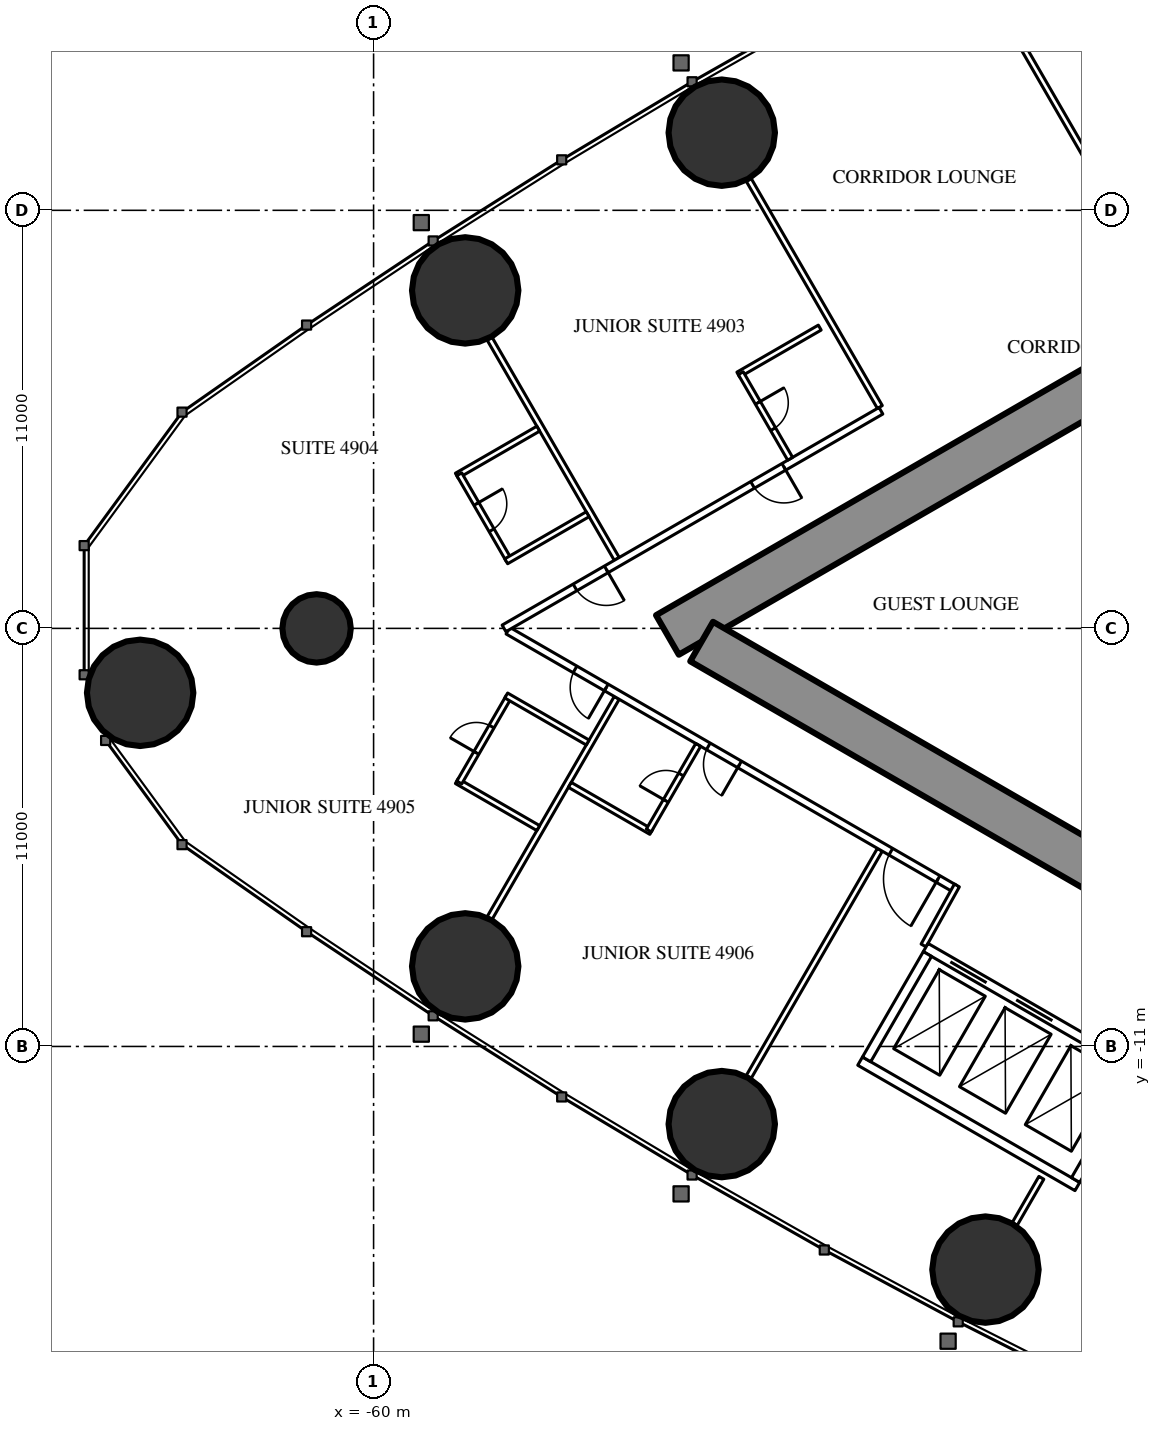
"""IFC4 building model, lengths in metres.
Left out: names, types, materials, properties, quantities, classifications, styles, units other than length and angle.
Written with IfcOpenShell. Run it as: python <this file> out.ifc"""

import sys

from ifc_helpers import new_model, si_unit, direction, frame, frame_2d, origin, origin_2d, place, context, subcontext, project, spatial, rectangle, circle, extrude, element, fill, save


model = new_model("IFC4")
c1 = context("Model", 3, precision=1e-05, world=origin(), true_north=direction((0.0, 1.0)))
c2 = subcontext(c1, "Body", "Model", "MODEL_VIEW")
j1 = project(units=[si_unit("LENGTHUNIT", "METRE"), si_unit("PLANEANGLEUNIT", "RADIAN")], contexts=[c1])
p1 = place(None, origin())
s1 = spatial("IfcSite", under=j1, at=p1, CompositionType="ELEMENT")
p2 = place(p1, origin())
s2 = spatial("IfcBuilding", under=s1, at=p2, CompositionType="ELEMENT")
p3 = place(p2, frame((0.0, 0.0, 184.3)))
s3 = spatial("IfcBuildingStorey", under=s2, at=p3, CompositionType="ELEMENT", Elevation=184.3)
for number, where, z_axis, x_axis in (
    (1, (-66.143, -1.695, 0.0), (0.0, 0.0, 1.0), (1.0, 0.0, 0.0)),
    (2, (-57.59, -8.893, 0.0), (0.0, 0.0, 1.0), (1.0, 0.0, 0.0)),
    (3, (-50.839, -13.043, 0.0), (0.0, 0.0, 1.0), (1.0, 0.0, 0.0)),
    (4, (-43.9, -16.871, 0.0), (0.0, 0.0, 1.0), (1.0, 0.0, 0.0)),
    (5, (-50.839, 13.043, 0.0), (0.0, 0.0, 1.0), (1.0, 0.0, 0.0)),
    (6, (-57.59, 8.893, 0.0), (0.0, 0.0, 1.0), (1.0, 0.0, 0.0)),
):
    element("IfcColumn", number, at=place(p3, frame(where, z_axis=z_axis, x_axis=x_axis)), inside=s3, PredefinedType="COLUMN", context=c2, shape_type="SweptSolid", body=[
        extrude(circle(Radius=1.4, at=origin_2d()), origin(), (0.0, 0.0, 1.0), 3.5),
    ])
p4 = place(p3, frame((-61.5, 0.0, 0.0), z_axis=(0.0, 0.0, 1.0), x_axis=(1.0, 0.0, 0.0)))
e7 = element("IfcColumn", 7, at=p4, inside=s3, PredefinedType="COLUMN", context=c2, shape_type="SweptSolid", body=[
    extrude(circle(Radius=0.9, at=origin_2d()), origin(), (0.0, 0.0, 1.0), 3.5),
])
p5 = place(p3, frame((-27.2, 14.3, 0.0), z_axis=(0.0, 0.0, 1.0), x_axis=(-0.866026593062, -0.499997940104, 0.0)))
e8 = element("IfcWall", 8, at=p5, inside=s3, PredefinedType="SHEAR", context=c2, shape_type="SweptSolid", body=[
    extrude(rectangle(XDim=28.946, YDim=1.2, at=frame_2d((14.473, 0.0))), origin(), (0.0, 0.0, 1.0), 3.5),
])
p6 = place(p5, frame((4.6, 0.0, 0.0)))
e9 = element("IfcOpeningElement", 9, at=p6, cuts=e8, PredefinedType="OPENING", context=c2, shape_type="SweptSolid", body=[
    extrude(rectangle(XDim=1.0, YDim=2.2, at=frame_2d((0.5, 1.1))), frame((0.0, 0.61, 0.0), z_axis=(0.0, -1.0, 0.0), x_axis=(1.0, 0.0, 0.0)), (0.0, 0.0, 1.0), 1.22),
])
p7 = place(p5, frame((13.395, 0.0, 0.0)))
e10 = element("IfcOpeningElement", 10, at=p7, cuts=e8, PredefinedType="OPENING", context=c2, shape_type="SweptSolid", body=[
    extrude(rectangle(XDim=1.8, YDim=2.2, at=frame_2d((0.9, 1.1))), frame((0.0, 0.61, 0.0), z_axis=(0.0, -1.0, 0.0), x_axis=(1.0, 0.0, 0.0)), (0.0, 0.0, 1.0), 1.22),
])
p8 = place(p3, frame((-27.2, -14.3, 0.0), z_axis=(0.0, 0.0, 1.0), x_axis=(-0.866024021859, 0.500002393557, 0.0)))
e11 = element("IfcWall", 11, at=p8, inside=s3, PredefinedType="SHEAR", context=c2, shape_type="SweptSolid", body=[
    extrude(rectangle(XDim=27.907, YDim=1.2, at=frame_2d((13.954, 0.0))), origin(), (0.0, 0.0, 1.0), 3.5),
])
p9 = place(p8, frame((4.6, 0.0, 0.0)))
e12 = element("IfcOpeningElement", 12, at=p9, cuts=e11, PredefinedType="OPENING", context=c2, shape_type="SweptSolid", body=[
    extrude(rectangle(XDim=1.0, YDim=2.2, at=frame_2d((0.5, 1.1))), frame((0.0, 0.61, 0.0), z_axis=(0.0, -1.0, 0.0), x_axis=(1.0, 0.0, 0.0)), (0.0, 0.0, 1.0), 1.22),
])
p10 = place(p8, frame((13.395, 0.0, 0.0)))
e13 = element("IfcOpeningElement", 13, at=p10, cuts=e11, PredefinedType="OPENING", context=c2, shape_type="SweptSolid", body=[
    extrude(rectangle(XDim=1.8, YDim=2.2, at=frame_2d((0.9, 1.1))), frame((0.0, 0.61, 0.0), z_axis=(0.0, -1.0, 0.0), x_axis=(1.0, 0.0, 0.0)), (0.0, 0.0, 1.0), 1.22),
])
p11 = place(p3, frame((-39.754, 9.823, 0.0), z_axis=(0.0, 0.0, 1.0), x_axis=(-0.499997670926, 0.866026748472, 0.0)))
e14 = element("IfcWall", 14, at=p11, inside=s3, PredefinedType="PARTITIONING", context=c2, shape_type="SweptSolid", body=[
    extrude(rectangle(XDim=6.757, YDim=0.15, at=frame_2d((3.379, 0.0))), origin(), (0.0, 0.0, 1.0), 2.3),
])
p12 = place(p3, frame((-46.679, 5.825, 0.0), z_axis=(0.0, 0.0, 1.0), x_axis=(-0.500006839597, 0.866021454905, 0.0)))
e15 = element("IfcWall", 15, at=p12, inside=s3, PredefinedType="PARTITIONING", context=c2, shape_type="SweptSolid", body=[
    extrude(rectangle(XDim=6.911, YDim=0.15, at=frame_2d((3.456, 0.0))), origin(), (0.0, 0.0, 1.0), 2.3),
])
p13 = place(p3, frame((-53.602, 1.828, 0.0), z_axis=(0.0, 0.0, 1.0), x_axis=(-0.49999191814, 0.866030069798, 0.0)))
e16 = element("IfcWall", 16, at=p13, inside=s3, PredefinedType="PARTITIONING", context=c2, shape_type="SweptSolid", body=[
    extrude(rectangle(XDim=6.692, YDim=0.15, at=frame_2d((3.346, 0.0))), origin(), (0.0, 0.0, 1.0), 2.3),
])
p14 = place(p3, frame((-46.679, -5.825, 0.0), z_axis=(0.0, 0.0, 1.0), x_axis=(-0.500006839597, -0.866021454905, 0.0)))
e17 = element("IfcWall", 17, at=p14, inside=s3, PredefinedType="PARTITIONING", context=c2, shape_type="SweptSolid", body=[
    extrude(rectangle(XDim=6.911, YDim=0.15, at=frame_2d((3.456, 0.0))), origin(), (0.0, 0.0, 1.0), 2.3),
])
p15 = place(p3, frame((-53.602, -1.828, 0.0), z_axis=(0.0, 0.0, 1.0), x_axis=(-0.49999191814, -0.866030069798, 0.0)))
e18 = element("IfcWall", 18, at=p15, inside=s3, PredefinedType="PARTITIONING", context=c2, shape_type="SweptSolid", body=[
    extrude(rectangle(XDim=6.692, YDim=0.15, at=frame_2d((3.346, 0.0))), origin(), (0.0, 0.0, 1.0), 2.3),
])
p16 = place(p3, frame((-42.429, -14.457, 0.0), z_axis=(0.0, 0.0, 1.0), x_axis=(-0.5000578829, -0.865991982497, 0.0)))
e19 = element("IfcWall", 19, at=p16, inside=s3, PredefinedType="PARTITIONING", context=c2, shape_type="SweptSolid", body=[
    extrude(rectangle(XDim=1.407, YDim=0.15, at=frame_2d((0.704, 0.0))), origin(), (0.0, 0.0, 1.0), 3.25),
])
p17 = place(p3, frame((-44.715, -6.844, 0.0), z_axis=(0.0, 0.0, 1.0), x_axis=(-0.866025261224, 0.500000246922, 0.0)))
e20 = element("IfcWall", 20, at=p17, inside=s3, PredefinedType="PARTITIONING", context=c2, shape_type="SweptSolid", body=[
    extrude(rectangle(XDim=13.567, YDim=0.2, at=frame_2d((6.783, 0.0))), origin(), (0.0, 0.0, 1.0), 3.25),
])
p18 = place(p17, frame((10.579, 0.0, 0.0)))
e21 = element("IfcOpeningElement", 21, at=p18, cuts=e20, PredefinedType="OPENING", context=c2, shape_type="SweptSolid", body=[
    extrude(rectangle(XDim=0.95, YDim=2.2, at=frame_2d((0.475, 1.1))), frame((0.0, 0.11, 0.0), z_axis=(0.0, -1.0, 0.0), x_axis=(1.0, 0.0, 0.0)), (0.0, 0.0, 1.0), 0.22),
])
p19 = place(p17, frame((6.529, 0.0, 0.0)))
e22 = element("IfcOpeningElement", 22, at=p19, cuts=e20, PredefinedType="OPENING", context=c2, shape_type="SweptSolid", body=[
    extrude(rectangle(XDim=0.95, YDim=2.2, at=frame_2d((0.475, 1.1))), frame((0.0, 0.11, 0.0), z_axis=(0.0, -1.0, 0.0), x_axis=(1.0, 0.0, 0.0)), (0.0, 0.0, 1.0), 0.22),
])
p20 = place(p17, frame((0.5, 0.0, 0.0)))
e23 = element("IfcOpeningElement", 23, at=p20, cuts=e20, PredefinedType="OPENING", context=c2, shape_type="SweptSolid", body=[
    extrude(rectangle(XDim=1.435, YDim=2.2, at=frame_2d((0.718, 1.1))), frame((0.0, 0.11, 0.0), z_axis=(0.0, -1.0, 0.0), x_axis=(1.0, 0.0, 0.0)), (0.0, 0.0, 1.0), 0.22),
])
p21 = place(p3, frame((-44.652, -6.764, 0.0), z_axis=(0.0, 0.0, 1.0), x_axis=(-0.485424724123, -0.874278466629, 0.0)))
e24 = element("IfcWall", 24, at=p21, inside=s3, PredefinedType="PARTITIONING", context=c2, shape_type="SweptSolid", body=[
    extrude(rectangle(XDim=1.805, YDim=0.15, at=frame_2d((0.903, 0.0))), origin(), (0.0, 0.0, 1.0), 3.25),
])
p22 = place(p3, frame((-46.65, 5.726, 0.0), z_axis=(0.0, 0.0, 1.0), x_axis=(-0.866027963864, -0.499995565786, 0.0)))
e25 = element("IfcWall", 25, at=p22, inside=s3, PredefinedType="PARTITIONING", context=c2, shape_type="SweptSolid", body=[
    extrude(rectangle(XDim=11.452, YDim=0.2, at=frame_2d((5.726, 0.0))), origin(), (0.0, 0.0, 1.0), 3.25),
])
p23 = place(p22, frame((2.95, 0.0, 0.0)))
e26 = element("IfcOpeningElement", 26, at=p23, cuts=e25, PredefinedType="OPENING", context=c2, shape_type="SweptSolid", body=[
    extrude(rectangle(XDim=0.95, YDim=2.2, at=frame_2d((0.475, 1.1))), frame((0.0, 0.11, 0.0), z_axis=(0.0, -1.0, 0.0), x_axis=(1.0, 0.0, 0.0)), (0.0, 0.0, 1.0), 0.22),
])
p24 = place(p22, frame((8.344, 0.0, 0.0)))
e27 = element("IfcOpeningElement", 27, at=p24, cuts=e25, PredefinedType="OPENING", context=c2, shape_type="SweptSolid", body=[
    extrude(rectangle(XDim=0.95, YDim=2.2, at=frame_2d((0.475, 1.1))), frame((0.0, 0.11, 0.0), z_axis=(0.0, -1.0, 0.0), x_axis=(1.0, 0.0, 0.0)), (0.0, 0.0, 1.0), 0.22),
])
p25 = place(p3, frame((-48.26, 7.914, 0.0), z_axis=(0.0, 0.0, 1.0), x_axis=(-0.866031185235, -0.4999899861, 0.0)))
e28 = element("IfcWall", 28, at=p25, inside=s3, PredefinedType="PARTITIONING", context=c2, shape_type="SweptSolid", body=[
    extrude(rectangle(XDim=2.475, YDim=0.15, at=frame_2d((1.238, 0.0))), origin(), (0.0, 0.0, 1.0), 3.25),
])
p26 = place(p3, frame((-49.039, 4.463, 0.0), z_axis=(0.0, 0.0, 1.0), x_axis=(-0.499936506574, 0.866062058628, 0.0)))
e29 = element("IfcWall", 29, at=p26, inside=s3, PredefinedType="PARTITIONING", context=c2, shape_type="SweptSolid", body=[
    extrude(rectangle(XDim=2.6, YDim=0.15, at=frame_2d((1.3, 0.0))), origin(), (0.0, 0.0, 1.0), 3.25),
])
p27 = place(p26, frame((0.9, 0.0, 0.0)))
e30 = element("IfcOpeningElement", 30, at=p27, cuts=e29, PredefinedType="OPENING", context=c2, shape_type="SweptSolid", body=[
    extrude(rectangle(XDim=0.8, YDim=2.2, at=frame_2d((0.4, 1.1))), frame((0.0, 0.085, 0.0), z_axis=(0.0, -1.0, 0.0), x_axis=(1.0, 0.0, 0.0)), (0.0, 0.0, 1.0), 0.17),
])
p28 = place(p3, frame((-55.667, 5.255, 0.0), z_axis=(0.0, 0.0, 1.0), x_axis=(-0.866006523861, -0.500032699561, 0.0)))
e31 = element("IfcWall", 31, at=p28, inside=s3, PredefinedType="PARTITIONING", context=c2, shape_type="SweptSolid", body=[
    extrude(rectangle(XDim=2.475, YDim=0.15, at=frame_2d((1.237, 0.0))), origin(), (0.0, 0.0, 1.0), 3.25),
])
p29 = place(p3, frame((-56.446, 1.803, 0.0), z_axis=(0.0, 0.0, 1.0), x_axis=(-0.499936506574, 0.866062058628, 0.0)))
e32 = element("IfcWall", 32, at=p29, inside=s3, PredefinedType="PARTITIONING", context=c2, shape_type="SweptSolid", body=[
    extrude(rectangle(XDim=2.6, YDim=0.15, at=frame_2d((1.3, 0.0))), origin(), (0.0, 0.0, 1.0), 3.25),
])
p30 = place(p29, frame((0.9, 0.0, 0.0)))
e33 = element("IfcOpeningElement", 33, at=p30, cuts=e32, PredefinedType="OPENING", context=c2, shape_type="SweptSolid", body=[
    extrude(rectangle(XDim=0.8, YDim=2.2, at=frame_2d((0.4, 1.1))), frame((0.0, 0.085, 0.0), z_axis=(0.0, -1.0, 0.0), x_axis=(1.0, 0.0, 0.0)), (0.0, 0.0, 1.0), 0.17),
])
p31 = place(p3, frame((-54.367, 3.003, 0.0), z_axis=(0.0, 0.0, 1.0), x_axis=(-0.866031185235, -0.4999899861, 0.0)))
e34 = element("IfcWall", 34, at=p31, inside=s3, PredefinedType="PARTITIONING", context=c2, shape_type="SweptSolid", body=[
    extrude(rectangle(XDim=2.475, YDim=0.15, at=frame_2d((1.238, 0.0))), origin(), (0.0, 0.0, 1.0), 3.25),
])
p32 = place(p3, frame((-55.667, -5.255, 0.0), z_axis=(0.0, 0.0, 1.0), x_axis=(-0.866006523861, 0.500032699561, 0.0)))
e35 = element("IfcWall", 35, at=p32, inside=s3, PredefinedType="PARTITIONING", context=c2, shape_type="SweptSolid", body=[
    extrude(rectangle(XDim=2.475, YDim=0.15, at=frame_2d((1.237, 0.0))), origin(), (0.0, 0.0, 1.0), 3.25),
])
p33 = place(p3, frame((-56.446, -1.803, 0.0), z_axis=(0.0, 0.0, 1.0), x_axis=(-0.499936506574, -0.866062058628, 0.0)))
e36 = element("IfcWall", 36, at=p33, inside=s3, PredefinedType="PARTITIONING", context=c2, shape_type="SweptSolid", body=[
    extrude(rectangle(XDim=2.6, YDim=0.15, at=frame_2d((1.3, 0.0))), origin(), (0.0, 0.0, 1.0), 3.25),
])
p34 = place(p33, frame((0.9, 0.0, 0.0)))
e37 = element("IfcOpeningElement", 37, at=p34, cuts=e36, PredefinedType="OPENING", context=c2, shape_type="SweptSolid", body=[
    extrude(rectangle(XDim=0.8, YDim=2.2, at=frame_2d((0.4, 1.1))), frame((0.0, 0.085, 0.0), z_axis=(0.0, -1.0, 0.0), x_axis=(1.0, 0.0, 0.0)), (0.0, 0.0, 1.0), 0.17),
])
for number, where, z_axis, x_axis in (
    (38, (-54.367, -3.003, 0.0), (0.0, 0.0, 1.0), (-0.866, 0.5, 0.0)),
    (39, (-52.694, -5.355, 0.0), (0.0, 0.0, 1.0), (-0.866, 0.5, 0.0)),
):
    element("IfcWall", number, at=place(p3, frame(where, z_axis=z_axis, x_axis=x_axis)), inside=s3, PredefinedType="PARTITIONING", context=c2, shape_type="SweptSolid", body=[
        extrude(rectangle(XDim=2.475, YDim=0.15, at=frame_2d((1.238, 0.0))), origin(), (0.0, 0.0, 1.0), 3.25),
    ])
p35 = place(p3, frame((-51.459, -3.065, 0.0), z_axis=(0.0, 0.0, 1.0), x_axis=(-0.499936506574, -0.866062058628, 0.0)))
e40 = element("IfcWall", 40, at=p35, inside=s3, PredefinedType="PARTITIONING", context=c2, shape_type="SweptSolid", body=[
    extrude(rectangle(XDim=2.6, YDim=0.15, at=frame_2d((1.3, 0.0))), origin(), (0.0, 0.0, 1.0), 3.25),
])
p36 = place(p35, frame((0.9, 0.0, 0.0)))
e41 = element("IfcOpeningElement", 41, at=p36, cuts=e40, PredefinedType="OPENING", context=c2, shape_type="SweptSolid", body=[
    extrude(rectangle(XDim=0.8, YDim=2.2, at=frame_2d((0.4, 1.1))), frame((0.0, 0.085, 0.0), z_axis=(0.0, -1.0, 0.0), x_axis=(1.0, 0.0, 0.0)), (0.0, 0.0, 1.0), 0.17),
])
p37 = place(p3, frame((-39.758, -11.697, 0.0), z_axis=(0.0, 0.0, 1.0), x_axis=(-0.866024194504, 0.500002094529, 0.0)))
e42 = element("IfcWall", 42, at=p37, inside=s3, PredefinedType="PARTITIONING", context=c2, shape_type="SweptSolid", body=[
    extrude(rectangle(XDim=6.6, YDim=0.25, at=frame_2d((3.3, 0.0))), origin(), (0.0, 0.0, 1.0), 3.25),
])
p38 = place(p37, frame((0.75, 0.0, 0.0)))
e43 = element("IfcOpeningElement", 43, at=p38, cuts=e42, PredefinedType="OPENING", context=c2, shape_type="SweptSolid", body=[
    extrude(rectangle(XDim=1.1, YDim=2.2, at=frame_2d((0.55, 1.1))), frame((0.0, 0.135, 0.0), z_axis=(0.0, -1.0, 0.0), x_axis=(1.0, 0.0, 0.0)), (0.0, 0.0, 1.0), 0.27),
])
p39 = place(p37, frame((2.75, 0.0, 0.0)))
e44 = element("IfcOpeningElement", 44, at=p39, cuts=e42, PredefinedType="OPENING", context=c2, shape_type="SweptSolid", body=[
    extrude(rectangle(XDim=1.1, YDim=2.2, at=frame_2d((0.55, 1.1))), frame((0.0, 0.135, 0.0), z_axis=(0.0, -1.0, 0.0), x_axis=(1.0, 0.0, 0.0)), (0.0, 0.0, 1.0), 0.27),
])
p40 = place(p37, frame((4.75, 0.0, 0.0)))
e45 = element("IfcOpeningElement", 45, at=p40, cuts=e42, PredefinedType="OPENING", context=c2, shape_type="SweptSolid", body=[
    extrude(rectangle(XDim=1.1, YDim=2.2, at=frame_2d((0.55, 1.1))), frame((0.0, 0.135, 0.0), z_axis=(0.0, -1.0, 0.0), x_axis=(1.0, 0.0, 0.0)), (0.0, 0.0, 1.0), 0.27),
])
p41 = place(p3, frame((-41.482, -14.686, 0.0), z_axis=(0.0, 0.0, 1.0), x_axis=(-0.86603344179, 0.499986077507, 0.0)))
e46 = element("IfcWall", 46, at=p41, inside=s3, PredefinedType="PARTITIONING", context=c2, shape_type="SweptSolid", body=[
    extrude(rectangle(XDim=6.6, YDim=0.25, at=frame_2d((3.3, 0.0))), origin(), (0.0, 0.0, 1.0), 3.25),
])
for number, where, z_axis, x_axis in (
    (47, (-39.928, -11.743, 0.0), (0.0, 0.0, 1.0), (-0.5, -0.866, 0.0)),
    (48, (-45.428, -8.568, 0.0), (0.0, 0.0, 1.0), (-0.5, -0.866, 0.0)),
):
    element("IfcWall", number, at=place(p3, frame(where, z_axis=z_axis, x_axis=x_axis)), inside=s3, PredefinedType="PARTITIONING", context=c2, shape_type="SweptSolid", body=[
        extrude(rectangle(XDim=3.201, YDim=0.25, at=frame_2d((1.6, 0.0))), origin(), (0.0, 0.0, 1.0), 3.25),
    ])
p42 = place(p27, origin())
e49 = element("IfcDoor", 49, at=p42, inside=s3, OperationType="SINGLE_SWING_RIGHT", PredefinedType="DOOR", context=c2, shape_type="SweptSolid", body=[
    extrude(rectangle(XDim=0.8, YDim=2.2, at=frame_2d((0.4, 1.1))), frame((0.0, 0.025, 0.0), z_axis=(0.0, -1.0, 0.0), x_axis=(1.0, 0.0, 0.0)), (0.0, 0.0, 1.0), 0.05),
])
fill(e30, e49)
p43 = place(p23, origin())
e50 = element("IfcDoor", 50, at=p43, inside=s3, OperationType="SINGLE_SWING_LEFT", PredefinedType="DOOR", context=c2, shape_type="SweptSolid", body=[
    extrude(rectangle(XDim=0.95, YDim=2.2, at=frame_2d((0.475, 1.1))), frame((0.0, 0.025, 0.0), z_axis=(0.0, -1.0, 0.0), x_axis=(1.0, 0.0, 0.0)), (0.0, 0.0, 1.0), 0.05),
])
fill(e26, e50)
p44 = place(p30, origin())
e51 = element("IfcDoor", 51, at=p44, inside=s3, OperationType="SINGLE_SWING_RIGHT", PredefinedType="DOOR", context=c2, shape_type="SweptSolid", body=[
    extrude(rectangle(XDim=0.8, YDim=2.2, at=frame_2d((0.4, 1.1))), frame((0.0, 0.025, 0.0), z_axis=(0.0, -1.0, 0.0), x_axis=(1.0, 0.0, 0.0)), (0.0, 0.0, 1.0), 0.05),
])
fill(e33, e51)
p45 = place(p24, origin())
e52 = element("IfcDoor", 52, at=p45, inside=s3, OperationType="SINGLE_SWING_LEFT", PredefinedType="DOOR", context=c2, shape_type="SweptSolid", body=[
    extrude(rectangle(XDim=0.95, YDim=2.2, at=frame_2d((0.475, 1.1))), frame((0.0, 0.025, 0.0), z_axis=(0.0, -1.0, 0.0), x_axis=(1.0, 0.0, 0.0)), (0.0, 0.0, 1.0), 0.05),
])
fill(e27, e52)
p46 = place(p34, origin())
e53 = element("IfcDoor", 53, at=p46, inside=s3, OperationType="SINGLE_SWING_RIGHT", PredefinedType="DOOR", context=c2, shape_type="SweptSolid", body=[
    extrude(rectangle(XDim=0.8, YDim=2.2, at=frame_2d((0.4, 1.1))), frame((0.0, 0.025, 0.0), z_axis=(0.0, -1.0, 0.0), x_axis=(1.0, 0.0, 0.0)), (0.0, 0.0, 1.0), 0.05),
])
fill(e37, e53)
p47 = place(p18, origin())
e54 = element("IfcDoor", 54, at=p47, inside=s3, OperationType="SINGLE_SWING_LEFT", PredefinedType="DOOR", context=c2, shape_type="SweptSolid", body=[
    extrude(rectangle(XDim=0.95, YDim=2.2, at=frame_2d((0.475, 1.1))), frame((0.0, 0.025, 0.0), z_axis=(0.0, -1.0, 0.0), x_axis=(1.0, 0.0, 0.0)), (0.0, 0.0, 1.0), 0.05),
])
fill(e21, e54)
p48 = place(p36, origin())
e55 = element("IfcDoor", 55, at=p48, inside=s3, OperationType="SINGLE_SWING_RIGHT", PredefinedType="DOOR", context=c2, shape_type="SweptSolid", body=[
    extrude(rectangle(XDim=0.8, YDim=2.2, at=frame_2d((0.4, 1.1))), frame((0.0, 0.025, 0.0), z_axis=(0.0, -1.0, 0.0), x_axis=(1.0, 0.0, 0.0)), (0.0, 0.0, 1.0), 0.05),
])
fill(e41, e55)
p49 = place(p19, origin())
e56 = element("IfcDoor", 56, at=p49, inside=s3, OperationType="SINGLE_SWING_LEFT", PredefinedType="DOOR", context=c2, shape_type="SweptSolid", body=[
    extrude(rectangle(XDim=0.95, YDim=2.2, at=frame_2d((0.475, 1.1))), frame((0.0, 0.025, 0.0), z_axis=(0.0, -1.0, 0.0), x_axis=(1.0, 0.0, 0.0)), (0.0, 0.0, 1.0), 0.05),
])
fill(e22, e56)
p50 = place(p20, origin())
e57 = element("IfcDoor", 57, at=p50, inside=s3, OperationType="SINGLE_SWING_LEFT", PredefinedType="DOOR", context=c2, shape_type="SweptSolid", body=[
    extrude(rectangle(XDim=1.435, YDim=2.2, at=frame_2d((0.718, 1.1))), frame((0.0, 0.025, 0.0), z_axis=(0.0, -1.0, 0.0), x_axis=(1.0, 0.0, 0.0)), (0.0, 0.0, 1.0), 0.05),
])
fill(e23, e57)
p51 = place(p39, origin())
e58 = element("IfcDoor", 58, at=p51, inside=s3, OperationType="DOUBLE_DOOR_SLIDING", PredefinedType="USERDEFINED", context=c2, shape_type="SweptSolid", body=[
    extrude(rectangle(XDim=1.1, YDim=2.2, at=frame_2d((0.55, 1.1))), frame((0.0, 0.025, 0.0), z_axis=(0.0, -1.0, 0.0), x_axis=(1.0, 0.0, 0.0)), (0.0, 0.0, 1.0), 0.05),
])
fill(e44, e58)
p52 = place(p40, origin())
e59 = element("IfcDoor", 59, at=p52, inside=s3, OperationType="DOUBLE_DOOR_SLIDING", PredefinedType="USERDEFINED", context=c2, shape_type="SweptSolid", body=[
    extrude(rectangle(XDim=1.1, YDim=2.2, at=frame_2d((0.55, 1.1))), frame((0.0, 0.025, 0.0), z_axis=(0.0, -1.0, 0.0), x_axis=(1.0, 0.0, 0.0)), (0.0, 0.0, 1.0), 0.05),
])
fill(e45, e59)
save(model, sys.argv[1])
